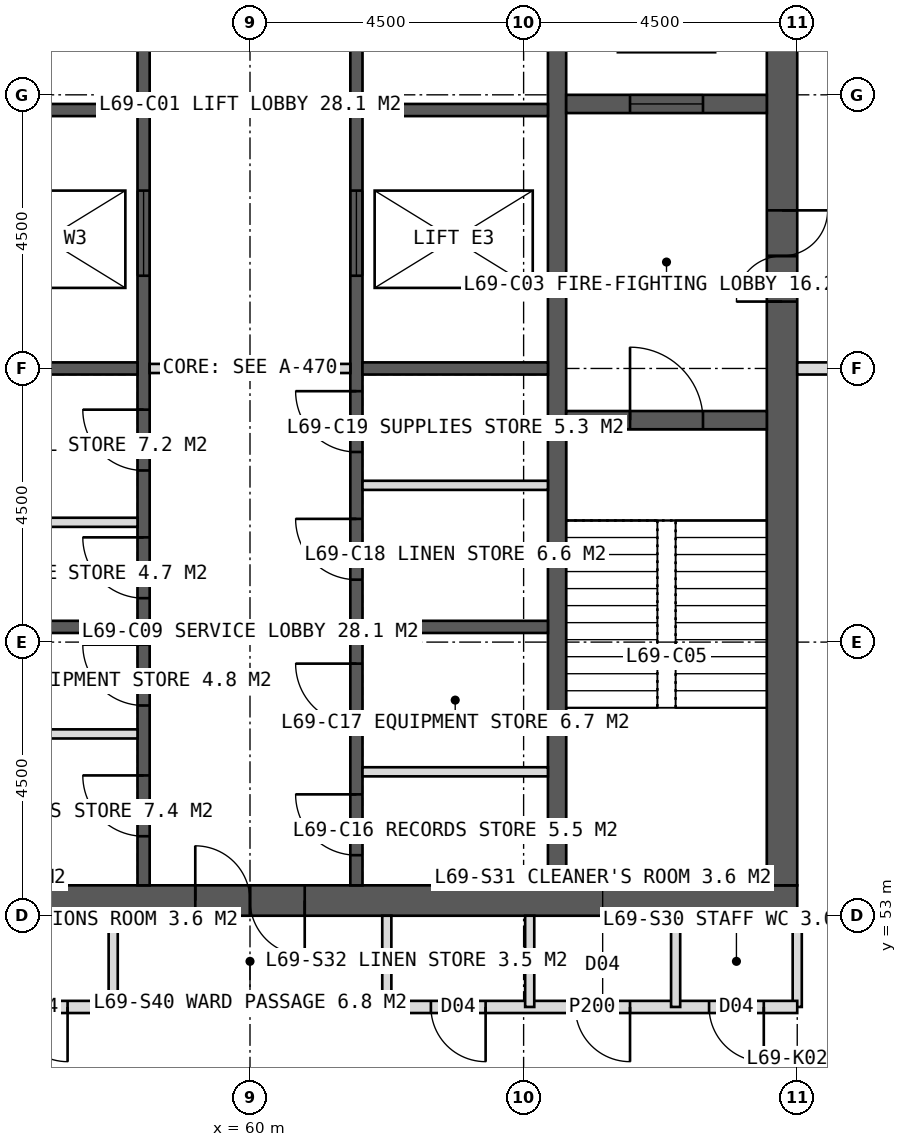
"""IFC4 building model, lengths in metres.
Left out: names, types, materials, properties, quantities, classifications, styles, units other than length and angle.
Written with IfcOpenShell. Run it as: python <this file> out.ifc"""

import sys

from ifc_helpers import new_model, si_unit, direction, frame, frame_2d, origin, place, context, subcontext, project, spatial, rectangle, extrude, element, fill, save


model = new_model("IFC4")
c1 = context("Model", 3, precision=1e-05, world=origin(), true_north=direction((0.0, 1.0)))
c2 = subcontext(c1, "Body", "Model", "MODEL_VIEW")
j1 = project(units=[si_unit("LENGTHUNIT", "METRE"), si_unit("PLANEANGLEUNIT", "RADIAN")], contexts=[c1])
p1 = place(None, origin())
s1 = spatial("IfcSite", under=j1, at=p1, CompositionType="ELEMENT")
p2 = place(p1, origin())
s2 = spatial("IfcBuilding", under=s1, at=p2, CompositionType="ELEMENT")
p3 = place(p2, frame((0.0, 0.0, 286.0)))
s3 = spatial("IfcBuildingStorey", under=s2, at=p3, CompositionType="ELEMENT", Elevation=286.0)
p4 = place(p3, frame((51.0, 53.25, 0.0), z_axis=(0.0, 0.0, 1.0), x_axis=(1.0, 0.0, 0.0)))
e1 = element("IfcWall", 1, at=p4, inside=s3, PredefinedType="SHEAR", context=c2, shape_type="SweptSolid", body=[
    extrude(rectangle(XDim=18.0, YDim=0.5, at=frame_2d((9.0, 0.0))), origin(), (0.0, 0.0, 1.0), 4.0),
])
p5 = place(p4, frame((8.1, 0.0, 0.0)))
e2 = element("IfcOpeningElement", 2, at=p5, cuts=e1, PredefinedType="OPENING", context=c2, shape_type="SweptSolid", body=[
    extrude(rectangle(XDim=1.8, YDim=2.2, at=frame_2d((0.9, 1.1))), frame((0.0, 0.26, 0.0), z_axis=(0.0, -1.0, 0.0), x_axis=(1.0, 0.0, 0.0)), (0.0, 0.0, 1.0), 0.52),
])
p6 = place(p3, frame((68.75, 53.5, 0.0), z_axis=(0.0, 0.0, 1.0), x_axis=(0.0, 1.0, 0.0)))
e3 = element("IfcWall", 3, at=p6, inside=s3, PredefinedType="SHEAR", context=c2, shape_type="SweptSolid", body=[
    extrude(rectangle(XDim=17.0, YDim=0.5, at=frame_2d((8.5, 0.0))), origin(), (0.0, 0.0, 1.0), 4.0),
])
p7 = place(p6, frame((9.6, 0.0, 0.0)))
e4 = element("IfcOpeningElement", 4, at=p7, cuts=e3, PredefinedType="OPENING", context=c2, shape_type="SweptSolid", body=[
    extrude(rectangle(XDim=1.5, YDim=2.2, at=frame_2d((0.75, 1.1))), frame((0.0, 0.26, 0.0), z_axis=(0.0, -1.0, 0.0), x_axis=(1.0, 0.0, 0.0)), (0.0, 0.0, 1.0), 0.52),
])
p8 = place(p3, frame((65.05, 53.5, 0.0), z_axis=(0.0, 0.0, 1.0), x_axis=(0.0, 1.0, 0.0)))
e5 = element("IfcWall", 5, at=p8, inside=s3, PredefinedType="SHEAR", context=c2, shape_type="SweptSolid", body=[
    extrude(rectangle(XDim=17.0, YDim=0.3, at=frame_2d((8.5, 0.0))), origin(), (0.0, 0.0, 1.0), 4.0),
])
p9 = place(p3, frame((58.25, 53.5, 0.0), z_axis=(0.0, 0.0, 1.0), x_axis=(0.0, 1.0, 0.0)))
e6 = element("IfcWall", 6, at=p9, inside=s3, PredefinedType="SHEAR", context=c2, shape_type="SweptSolid", body=[
    extrude(rectangle(XDim=17.0, YDim=0.2, at=frame_2d((8.5, 0.0))), origin(), (0.0, 0.0, 1.0), 4.0),
])
p10 = place(p9, frame((0.808, 0.0, 0.0)))
e7 = element("IfcOpeningElement", 7, at=p10, cuts=e6, PredefinedType="OPENING", context=c2, shape_type="SweptSolid", body=[
    extrude(rectangle(XDim=1.0, YDim=2.1, at=frame_2d((0.5, 1.05))), frame((0.0, 0.11, 0.0), z_axis=(0.0, -1.0, 0.0), x_axis=(1.0, 0.0, 0.0)), (0.0, 0.0, 1.0), 0.22),
])
p11 = place(p9, frame((2.958, 0.0, 0.0)))
e8 = element("IfcOpeningElement", 8, at=p11, cuts=e6, PredefinedType="OPENING", context=c2, shape_type="SweptSolid", body=[
    extrude(rectangle(XDim=1.0, YDim=2.1, at=frame_2d((0.5, 1.05))), frame((0.0, 0.11, 0.0), z_axis=(0.0, -1.0, 0.0), x_axis=(1.0, 0.0, 0.0)), (0.0, 0.0, 1.0), 0.22),
])
p12 = place(p9, frame((4.722, 0.0, 0.0)))
e9 = element("IfcOpeningElement", 9, at=p12, cuts=e6, PredefinedType="OPENING", context=c2, shape_type="SweptSolid", body=[
    extrude(rectangle(XDim=1.0, YDim=2.1, at=frame_2d((0.5, 1.05))), frame((0.0, 0.11, 0.0), z_axis=(0.0, -1.0, 0.0), x_axis=(1.0, 0.0, 0.0)), (0.0, 0.0, 1.0), 0.22),
])
p13 = place(p9, frame((6.823, 0.0, 0.0)))
e10 = element("IfcOpeningElement", 10, at=p13, cuts=e6, PredefinedType="OPENING", context=c2, shape_type="SweptSolid", body=[
    extrude(rectangle(XDim=1.0, YDim=2.1, at=frame_2d((0.5, 1.05))), frame((0.0, 0.11, 0.0), z_axis=(0.0, -1.0, 0.0), x_axis=(1.0, 0.0, 0.0)), (0.0, 0.0, 1.0), 0.22),
])
p14 = place(p9, frame((10.025, 0.0, 0.0)))
e11 = element("IfcOpeningElement", 11, at=p14, cuts=e6, PredefinedType="OPENING", context=c2, shape_type="SweptSolid", body=[
    extrude(rectangle(XDim=1.4, YDim=2.2, at=frame_2d((0.7, 1.1))), frame((0.0, 0.11, 0.0), z_axis=(0.0, -1.0, 0.0), x_axis=(1.0, 0.0, 0.0)), (0.0, 0.0, 1.0), 0.22),
])
p15 = place(p9, frame((14.325, 0.0, 0.0)))
e12 = element("IfcOpeningElement", 12, at=p15, cuts=e6, PredefinedType="OPENING", context=c2, shape_type="SweptSolid", body=[
    extrude(rectangle(XDim=1.4, YDim=2.2, at=frame_2d((0.7, 1.1))), frame((0.0, 0.11, 0.0), z_axis=(0.0, -1.0, 0.0), x_axis=(1.0, 0.0, 0.0)), (0.0, 0.0, 1.0), 0.22),
])
p16 = place(p3, frame((61.75, 53.5, 0.0), z_axis=(0.0, 0.0, 1.0), x_axis=(0.0, 1.0, 0.0)))
e13 = element("IfcWall", 13, at=p16, inside=s3, PredefinedType="SHEAR", context=c2, shape_type="SweptSolid", body=[
    extrude(rectangle(XDim=17.0, YDim=0.2, at=frame_2d((8.5, 0.0))), origin(), (0.0, 0.0, 1.0), 4.0),
])
p17 = place(p16, frame((0.496, 0.0, 0.0)))
e14 = element("IfcOpeningElement", 14, at=p17, cuts=e13, PredefinedType="OPENING", context=c2, shape_type="SweptSolid", body=[
    extrude(rectangle(XDim=1.0, YDim=2.1, at=frame_2d((0.5, 1.05))), frame((0.0, 0.11, 0.0), z_axis=(0.0, -1.0, 0.0), x_axis=(1.0, 0.0, 0.0)), (0.0, 0.0, 1.0), 0.22),
])
p18 = place(p16, frame((2.646, 0.0, 0.0)))
e15 = element("IfcOpeningElement", 15, at=p18, cuts=e13, PredefinedType="OPENING", context=c2, shape_type="SweptSolid", body=[
    extrude(rectangle(XDim=1.0, YDim=2.1, at=frame_2d((0.5, 1.05))), frame((0.0, 0.11, 0.0), z_axis=(0.0, -1.0, 0.0), x_axis=(1.0, 0.0, 0.0)), (0.0, 0.0, 1.0), 0.22),
])
p19 = place(p16, frame((5.027, 0.0, 0.0)))
e16 = element("IfcOpeningElement", 16, at=p19, cuts=e13, PredefinedType="OPENING", context=c2, shape_type="SweptSolid", body=[
    extrude(rectangle(XDim=1.0, YDim=2.1, at=frame_2d((0.5, 1.05))), frame((0.0, 0.11, 0.0), z_axis=(0.0, -1.0, 0.0), x_axis=(1.0, 0.0, 0.0)), (0.0, 0.0, 1.0), 0.22),
])
p20 = place(p16, frame((7.126, 0.0, 0.0)))
e17 = element("IfcOpeningElement", 17, at=p20, cuts=e13, PredefinedType="OPENING", context=c2, shape_type="SweptSolid", body=[
    extrude(rectangle(XDim=1.0, YDim=2.1, at=frame_2d((0.5, 1.05))), frame((0.0, 0.11, 0.0), z_axis=(0.0, -1.0, 0.0), x_axis=(1.0, 0.0, 0.0)), (0.0, 0.0, 1.0), 0.22),
])
p21 = place(p16, frame((10.025, 0.0, 0.0)))
e18 = element("IfcOpeningElement", 18, at=p21, cuts=e13, PredefinedType="OPENING", context=c2, shape_type="SweptSolid", body=[
    extrude(rectangle(XDim=1.4, YDim=2.2, at=frame_2d((0.7, 1.1))), frame((0.0, 0.11, 0.0), z_axis=(0.0, -1.0, 0.0), x_axis=(1.0, 0.0, 0.0)), (0.0, 0.0, 1.0), 0.22),
])
p22 = place(p16, frame((14.325, 0.0, 0.0)))
e19 = element("IfcOpeningElement", 19, at=p22, cuts=e13, PredefinedType="OPENING", context=c2, shape_type="SweptSolid", body=[
    extrude(rectangle(XDim=1.4, YDim=2.2, at=frame_2d((0.7, 1.1))), frame((0.0, 0.11, 0.0), z_axis=(0.0, -1.0, 0.0), x_axis=(1.0, 0.0, 0.0)), (0.0, 0.0, 1.0), 0.22),
])
for number, where, z_axis, x_axis in (
    (20, (55.1, 57.75, 0.0), (0.0, 0.0, 1.0), (1.0, 0.0, 0.0)),
    (21, (61.85, 57.75, 0.0), (0.0, 0.0, 1.0), (1.0, 0.0, 0.0)),
    (22, (55.1, 62.0, 0.0), (0.0, 0.0, 1.0), (1.0, 0.0, 0.0)),
    (23, (61.85, 62.0, 0.0), (0.0, 0.0, 1.0), (1.0, 0.0, 0.0)),
    (24, (55.1, 66.25, 0.0), (0.0, 0.0, 1.0), (1.0, 0.0, 0.0)),
    (25, (61.85, 66.25, 0.0), (0.0, 0.0, 1.0), (1.0, 0.0, 0.0)),
):
    element("IfcWall", number, at=place(p3, frame(where, z_axis=z_axis, x_axis=x_axis)), inside=s3, PredefinedType="SHEAR", context=c2, shape_type="SweptSolid", body=[
        extrude(rectangle(XDim=3.05, YDim=0.2, at=frame_2d((1.525, 0.0))), origin(), (0.0, 0.0, 1.0), 4.0),
    ])
p23 = place(p3, frame((65.2, 61.15, 0.0), z_axis=(0.0, 0.0, 1.0), x_axis=(1.0, 0.0, 0.0)))
e26 = element("IfcWall", 26, at=p23, inside=s3, PredefinedType="SHEAR", context=c2, shape_type="SweptSolid", body=[
    extrude(rectangle(XDim=3.3, YDim=0.3, at=frame_2d((1.65, 0.0))), origin(), (0.0, 0.0, 1.0), 4.0),
])
p24 = place(p23, frame((1.05, 0.0, 0.0)))
e27 = element("IfcOpeningElement", 27, at=p24, cuts=e26, PredefinedType="OPENING", context=c2, shape_type="SweptSolid", body=[
    extrude(rectangle(XDim=1.2, YDim=2.1, at=frame_2d((0.6, 1.05))), frame((0.0, 0.16, 0.0), z_axis=(0.0, -1.0, 0.0), x_axis=(1.0, 0.0, 0.0)), (0.0, 0.0, 1.0), 0.32),
])
p25 = place(p3, frame((65.2, 66.35, 0.0), z_axis=(0.0, 0.0, 1.0), x_axis=(1.0, 0.0, 0.0)))
e28 = element("IfcWall", 28, at=p25, inside=s3, PredefinedType="SHEAR", context=c2, shape_type="SweptSolid", body=[
    extrude(rectangle(XDim=3.3, YDim=0.3, at=frame_2d((1.65, 0.0))), origin(), (0.0, 0.0, 1.0), 4.0),
])
p26 = place(p25, frame((1.05, 0.0, 0.0)))
e29 = element("IfcOpeningElement", 29, at=p26, cuts=e28, PredefinedType="OPENING", context=c2, shape_type="SweptSolid", body=[
    extrude(rectangle(XDim=1.2, YDim=2.2, at=frame_2d((0.6, 1.1))), frame((0.0, 0.16, 0.0), z_axis=(0.0, -1.0, 0.0), x_axis=(1.0, 0.0, 0.0)), (0.0, 0.0, 1.0), 0.32),
])
p27 = place(p3, frame((69.0, 53.0, 0.0), z_axis=(0.0, 0.0, 1.0), x_axis=(0.0, -1.0, 0.0)))
e30 = element("IfcWall", 30, at=p27, inside=s3, PredefinedType="PARTITIONING", context=c2, shape_type="SweptSolid", body=[
    extrude(rectangle(XDim=1.5, YDim=0.15, at=frame_2d((0.75, 0.0))), origin(), (0.0, 0.0, 1.0), 3.75),
])
p28 = place(p3, frame((69.0, 51.5, 0.0), z_axis=(0.0, 0.0, 1.0), x_axis=(-1.0, 0.0, 0.0)))
e31 = element("IfcWall", 31, at=p28, inside=s3, PredefinedType="PARTITIONING", context=c2, shape_type="SweptSolid", body=[
    extrude(rectangle(XDim=6.75, YDim=0.2, at=frame_2d((3.375, 0.0))), origin(), (0.0, 0.0, 1.0), 3.75),
])
p29 = place(p28, frame((0.55, 0.0, 0.0)))
e32 = element("IfcOpeningElement", 32, at=p29, cuts=e31, PredefinedType="OPENING", context=c2, shape_type="SweptSolid", body=[
    extrude(rectangle(XDim=0.9, YDim=2.1, at=frame_2d((0.45, 1.05))), frame((0.0, 0.11, 0.0), z_axis=(0.0, -1.0, 0.0), x_axis=(1.0, 0.0, 0.0)), (0.0, 0.0, 1.0), 0.22),
])
p30 = place(p28, frame((2.75, 0.0, 0.0)))
e33 = element("IfcOpeningElement", 33, at=p30, cuts=e31, PredefinedType="OPENING", context=c2, shape_type="SweptSolid", body=[
    extrude(rectangle(XDim=0.9, YDim=2.1, at=frame_2d((0.45, 1.05))), frame((0.0, 0.11, 0.0), z_axis=(0.0, -1.0, 0.0), x_axis=(1.0, 0.0, 0.0)), (0.0, 0.0, 1.0), 0.22),
])
p31 = place(p28, frame((5.125, 0.0, 0.0)))
e34 = element("IfcOpeningElement", 34, at=p31, cuts=e31, PredefinedType="OPENING", context=c2, shape_type="SweptSolid", body=[
    extrude(rectangle(XDim=0.9, YDim=2.1, at=frame_2d((0.45, 1.05))), frame((0.0, 0.11, 0.0), z_axis=(0.0, -1.0, 0.0), x_axis=(1.0, 0.0, 0.0)), (0.0, 0.0, 1.0), 0.22),
])
p32 = place(p3, frame((57.75, 51.5, 0.0), z_axis=(0.0, 0.0, 1.0), x_axis=(-1.0, 0.0, 0.0)))
e35 = element("IfcWall", 35, at=p32, inside=s3, PredefinedType="PARTITIONING", context=c2, shape_type="SweptSolid", body=[
    extrude(rectangle(XDim=8.25, YDim=0.2, at=frame_2d((4.125, 0.0))), origin(), (0.0, 0.0, 1.0), 3.75),
])
p33 = place(p32, frame((0.75, 0.0, 0.0)))
e36 = element("IfcOpeningElement", 36, at=p33, cuts=e35, PredefinedType="OPENING", context=c2, shape_type="SweptSolid", body=[
    extrude(rectangle(XDim=0.9, YDim=2.1, at=frame_2d((0.45, 1.05))), frame((0.0, 0.11, 0.0), z_axis=(0.0, -1.0, 0.0), x_axis=(1.0, 0.0, 0.0)), (0.0, 0.0, 1.0), 0.22),
])
p34 = place(p32, frame((3.2, 0.0, 0.0)))
e37 = element("IfcOpeningElement", 37, at=p34, cuts=e35, PredefinedType="OPENING", context=c2, shape_type="SweptSolid", body=[
    extrude(rectangle(XDim=0.9, YDim=2.1, at=frame_2d((0.45, 1.05))), frame((0.0, 0.11, 0.0), z_axis=(0.0, -1.0, 0.0), x_axis=(1.0, 0.0, 0.0)), (0.0, 0.0, 1.0), 0.22),
])
p35 = place(p32, frame((6.075, 0.0, 0.0)))
e38 = element("IfcOpeningElement", 38, at=p35, cuts=e35, PredefinedType="OPENING", context=c2, shape_type="SweptSolid", body=[
    extrude(rectangle(XDim=1.0, YDim=2.1, at=frame_2d((0.5, 1.05))), frame((0.0, 0.11, 0.0), z_axis=(0.0, -1.0, 0.0), x_axis=(1.0, 0.0, 0.0)), (0.0, 0.0, 1.0), 0.22),
])
for number, where, z_axis, x_axis in (
    (39, (62.25, 53.0, 0.0), (0.0, 0.0, 1.0), (0.0, -1.0, 0.0)),
    (40, (57.75, 53.0, 0.0), (0.0, 0.0, 1.0), (0.0, -1.0, 0.0)),
    (41, (67.0, 53.0, 0.0), (0.0, 0.0, 1.0), (0.0, -1.0, 0.0)),
):
    element("IfcWall", number, at=place(p3, frame(where, z_axis=z_axis, x_axis=x_axis)), inside=s3, PredefinedType="PARTITIONING", context=c2, shape_type="SweptSolid", body=[
        extrude(rectangle(XDim=1.5, YDim=0.15, at=frame_2d((0.75, 0.0))), origin(), (0.0, 0.0, 1.0), 3.75),
    ])
p36 = place(p3, frame((64.6, 53.0, 0.0), z_axis=(0.0, 0.0, 1.0), x_axis=(0.0, -1.0, 0.0)))
e42 = element("IfcWall", 42, at=p36, inside=s3, PredefinedType="PARTITIONING", context=c2, shape_type="SweptSolid", body=[
    extrude(rectangle(XDim=1.5, YDim=0.15, at=frame_2d((0.75, 0.0))), origin(), (0.0, 0.0, 1.0), 2.95),
])
p37 = place(p3, frame((69.0, 62.0, 0.0), z_axis=(0.0, 0.0, 1.0), x_axis=(1.0, 0.0, 0.0)))
e43 = element("IfcWall", 43, at=p37, inside=s3, PredefinedType="SOLIDWALL", context=c2, shape_type="SweptSolid", body=[
    extrude(rectangle(XDim=1.5, YDim=0.2, at=frame_2d((0.75, 0.0))), origin(), (0.0, 0.0, 1.0), 2.997),
])
for number, where, z_axis, x_axis in (
    (44, (55.1, 55.99, 0.0), (0.0, 0.0, 1.0), (1.0, 0.0, 0.0)),
    (45, (61.85, 55.367, 0.0), (0.0, 0.0, 1.0), (1.0, 0.0, 0.0)),
    (46, (55.1, 59.47, 0.0), (0.0, 0.0, 1.0), (1.0, 0.0, 0.0)),
    (47, (61.85, 60.078, 0.0), (0.0, 0.0, 1.0), (1.0, 0.0, 0.0)),
):
    element("IfcWall", number, at=place(p3, frame(where, z_axis=z_axis, x_axis=x_axis)), inside=s3, PredefinedType="PARTITIONING", context=c2, shape_type="SweptSolid", body=[
        extrude(rectangle(XDim=3.05, YDim=0.15, at=frame_2d((1.525, 0.0))), origin(), (0.0, 0.0, 1.0), 3.75),
    ])
p38 = place(p3, frame((58.35, 62.0, 0.0), z_axis=(0.0, 0.0, 1.0), x_axis=(1.0, 0.0, 0.0)))
e48 = element("IfcWall", 48, at=p38, inside=s3, PredefinedType="PARTITIONING", context=c2, shape_type="SweptSolid", body=[
    extrude(rectangle(XDim=3.3, YDim=0.15, at=frame_2d((1.65, 0.0))), origin(), (0.0, 0.0, 1.0), 3.75),
])
p39 = place(p29, origin())
e49 = element("IfcDoor", 49, at=p39, inside=s3, OperationType="SINGLE_SWING_LEFT", PredefinedType="DOOR", context=c2, shape_type="SweptSolid", body=[
    extrude(rectangle(XDim=0.9, YDim=2.1, at=frame_2d((0.45, 1.05))), frame((0.0, 0.025, 0.0), z_axis=(0.0, -1.0, 0.0), x_axis=(1.0, 0.0, 0.0)), (0.0, 0.0, 1.0), 0.05),
])
fill(e32, e49)
p40 = place(p30, origin())
e50 = element("IfcDoor", 50, at=p40, inside=s3, OperationType="SINGLE_SWING_LEFT", PredefinedType="DOOR", context=c2, shape_type="SweptSolid", body=[
    extrude(rectangle(XDim=0.9, YDim=2.1, at=frame_2d((0.45, 1.05))), frame((0.0, 0.025, 0.0), z_axis=(0.0, -1.0, 0.0), x_axis=(1.0, 0.0, 0.0)), (0.0, 0.0, 1.0), 0.05),
])
fill(e33, e50)
p41 = place(p31, origin())
e51 = element("IfcDoor", 51, at=p41, inside=s3, OperationType="SINGLE_SWING_LEFT", PredefinedType="DOOR", context=c2, shape_type="SweptSolid", body=[
    extrude(rectangle(XDim=0.9, YDim=2.1, at=frame_2d((0.45, 1.05))), frame((0.0, 0.025, 0.0), z_axis=(0.0, -1.0, 0.0), x_axis=(1.0, 0.0, 0.0)), (0.0, 0.0, 1.0), 0.05),
])
fill(e34, e51)
p42 = place(p33, origin())
e52 = element("IfcDoor", 52, at=p42, inside=s3, OperationType="SINGLE_SWING_LEFT", PredefinedType="DOOR", context=c2, shape_type="SweptSolid", body=[
    extrude(rectangle(XDim=0.9, YDim=2.1, at=frame_2d((0.45, 1.05))), frame((0.0, 0.025, 0.0), z_axis=(0.0, -1.0, 0.0), x_axis=(1.0, 0.0, 0.0)), (0.0, 0.0, 1.0), 0.05),
])
fill(e36, e52)
p43 = place(p7, origin())
e53 = element("IfcDoor", 53, at=p43, inside=s3, OperationType="DOUBLE_DOOR_SINGLE_SWING", PredefinedType="DOOR", context=c2, shape_type="SweptSolid", body=[
    extrude(rectangle(XDim=1.5, YDim=2.2, at=frame_2d((0.75, 1.1))), frame((0.0, 0.025, 0.0), z_axis=(0.0, -1.0, 0.0), x_axis=(1.0, 0.0, 0.0)), (0.0, 0.0, 1.0), 0.05),
])
fill(e4, e53)
p44 = place(p24, origin())
e54 = element("IfcDoor", 54, at=p44, inside=s3, OperationType="SINGLE_SWING_LEFT", PredefinedType="DOOR", context=c2, shape_type="SweptSolid", body=[
    extrude(rectangle(XDim=1.2, YDim=2.1, at=frame_2d((0.6, 1.05))), frame((0.0, 0.025, 0.0), z_axis=(0.0, -1.0, 0.0), x_axis=(1.0, 0.0, 0.0)), (0.0, 0.0, 1.0), 0.05),
])
fill(e27, e54)
p45 = place(p26, origin())
e55 = element("IfcDoor", 55, at=p45, inside=s3, OperationType="SLIDING_TO_LEFT", PredefinedType="DOOR", context=c2, shape_type="SweptSolid", body=[
    extrude(rectangle(XDim=1.2, YDim=2.2, at=frame_2d((0.6, 1.1))), frame((0.0, 0.025, 0.0), z_axis=(0.0, -1.0, 0.0), x_axis=(1.0, 0.0, 0.0)), (0.0, 0.0, 1.0), 0.05),
])
fill(e29, e55)
p46 = place(p10, origin())
e56 = element("IfcDoor", 56, at=p46, inside=s3, OperationType="SINGLE_SWING_RIGHT", PredefinedType="DOOR", context=c2, shape_type="SweptSolid", body=[
    extrude(rectangle(XDim=1.0, YDim=2.1, at=frame_2d((0.5, 1.05))), frame((0.0, 0.025, 0.0), z_axis=(0.0, -1.0, 0.0), x_axis=(1.0, 0.0, 0.0)), (0.0, 0.0, 1.0), 0.05),
])
fill(e7, e56)
p47 = place(p11, origin())
e57 = element("IfcDoor", 57, at=p47, inside=s3, OperationType="SINGLE_SWING_RIGHT", PredefinedType="DOOR", context=c2, shape_type="SweptSolid", body=[
    extrude(rectangle(XDim=1.0, YDim=2.1, at=frame_2d((0.5, 1.05))), frame((0.0, 0.025, 0.0), z_axis=(0.0, -1.0, 0.0), x_axis=(1.0, 0.0, 0.0)), (0.0, 0.0, 1.0), 0.05),
])
fill(e8, e57)
p48 = place(p17, origin())
e58 = element("IfcDoor", 58, at=p48, inside=s3, OperationType="SINGLE_SWING_RIGHT", PredefinedType="DOOR", context=c2, shape_type="SweptSolid", body=[
    extrude(rectangle(XDim=1.0, YDim=2.1, at=frame_2d((0.5, 1.05))), frame((0.0, 0.025, 0.0), z_axis=(0.0, -1.0, 0.0), x_axis=(1.0, 0.0, 0.0)), (0.0, 0.0, 1.0), 0.05),
])
fill(e14, e58)
p49 = place(p18, origin())
e59 = element("IfcDoor", 59, at=p49, inside=s3, OperationType="SINGLE_SWING_RIGHT", PredefinedType="DOOR", context=c2, shape_type="SweptSolid", body=[
    extrude(rectangle(XDim=1.0, YDim=2.1, at=frame_2d((0.5, 1.05))), frame((0.0, 0.025, 0.0), z_axis=(0.0, -1.0, 0.0), x_axis=(1.0, 0.0, 0.0)), (0.0, 0.0, 1.0), 0.05),
])
fill(e15, e59)
p50 = place(p12, origin())
e60 = element("IfcDoor", 60, at=p50, inside=s3, OperationType="SINGLE_SWING_RIGHT", PredefinedType="DOOR", context=c2, shape_type="SweptSolid", body=[
    extrude(rectangle(XDim=1.0, YDim=2.1, at=frame_2d((0.5, 1.05))), frame((0.0, 0.025, 0.0), z_axis=(0.0, -1.0, 0.0), x_axis=(1.0, 0.0, 0.0)), (0.0, 0.0, 1.0), 0.05),
])
fill(e9, e60)
p51 = place(p13, origin())
e61 = element("IfcDoor", 61, at=p51, inside=s3, OperationType="SINGLE_SWING_RIGHT", PredefinedType="DOOR", context=c2, shape_type="SweptSolid", body=[
    extrude(rectangle(XDim=1.0, YDim=2.1, at=frame_2d((0.5, 1.05))), frame((0.0, 0.025, 0.0), z_axis=(0.0, -1.0, 0.0), x_axis=(1.0, 0.0, 0.0)), (0.0, 0.0, 1.0), 0.05),
])
fill(e10, e61)
p52 = place(p19, origin())
e62 = element("IfcDoor", 62, at=p52, inside=s3, OperationType="SINGLE_SWING_RIGHT", PredefinedType="DOOR", context=c2, shape_type="SweptSolid", body=[
    extrude(rectangle(XDim=1.0, YDim=2.1, at=frame_2d((0.5, 1.05))), frame((0.0, 0.025, 0.0), z_axis=(0.0, -1.0, 0.0), x_axis=(1.0, 0.0, 0.0)), (0.0, 0.0, 1.0), 0.05),
])
fill(e16, e62)
p53 = place(p20, origin())
e63 = element("IfcDoor", 63, at=p53, inside=s3, OperationType="SINGLE_SWING_RIGHT", PredefinedType="DOOR", context=c2, shape_type="SweptSolid", body=[
    extrude(rectangle(XDim=1.0, YDim=2.1, at=frame_2d((0.5, 1.05))), frame((0.0, 0.025, 0.0), z_axis=(0.0, -1.0, 0.0), x_axis=(1.0, 0.0, 0.0)), (0.0, 0.0, 1.0), 0.05),
])
fill(e17, e63)
p54 = place(p14, origin())
e64 = element("IfcDoor", 64, at=p54, inside=s3, OperationType="SLIDING_TO_LEFT", PredefinedType="DOOR", context=c2, shape_type="SweptSolid", body=[
    extrude(rectangle(XDim=1.4, YDim=2.2, at=frame_2d((0.7, 1.1))), frame((0.0, 0.025, 0.0), z_axis=(0.0, -1.0, 0.0), x_axis=(1.0, 0.0, 0.0)), (0.0, 0.0, 1.0), 0.05),
])
fill(e11, e64)
p55 = place(p21, origin())
e65 = element("IfcDoor", 65, at=p55, inside=s3, OperationType="SLIDING_TO_LEFT", PredefinedType="DOOR", context=c2, shape_type="SweptSolid", body=[
    extrude(rectangle(XDim=1.4, YDim=2.2, at=frame_2d((0.7, 1.1))), frame((0.0, 0.025, 0.0), z_axis=(0.0, -1.0, 0.0), x_axis=(1.0, 0.0, 0.0)), (0.0, 0.0, 1.0), 0.05),
])
fill(e18, e65)
p56 = place(p5, origin())
e66 = element("IfcDoor", 66, at=p56, inside=s3, OperationType="DOUBLE_DOOR_SINGLE_SWING", PredefinedType="DOOR", context=c2, shape_type="SweptSolid", body=[
    extrude(rectangle(XDim=1.8, YDim=2.2, at=frame_2d((0.9, 1.1))), frame((0.0, 0.025, 0.0), z_axis=(0.0, -1.0, 0.0), x_axis=(1.0, 0.0, 0.0)), (0.0, 0.0, 1.0), 0.05),
])
fill(e2, e66)
save(model, sys.argv[1])
